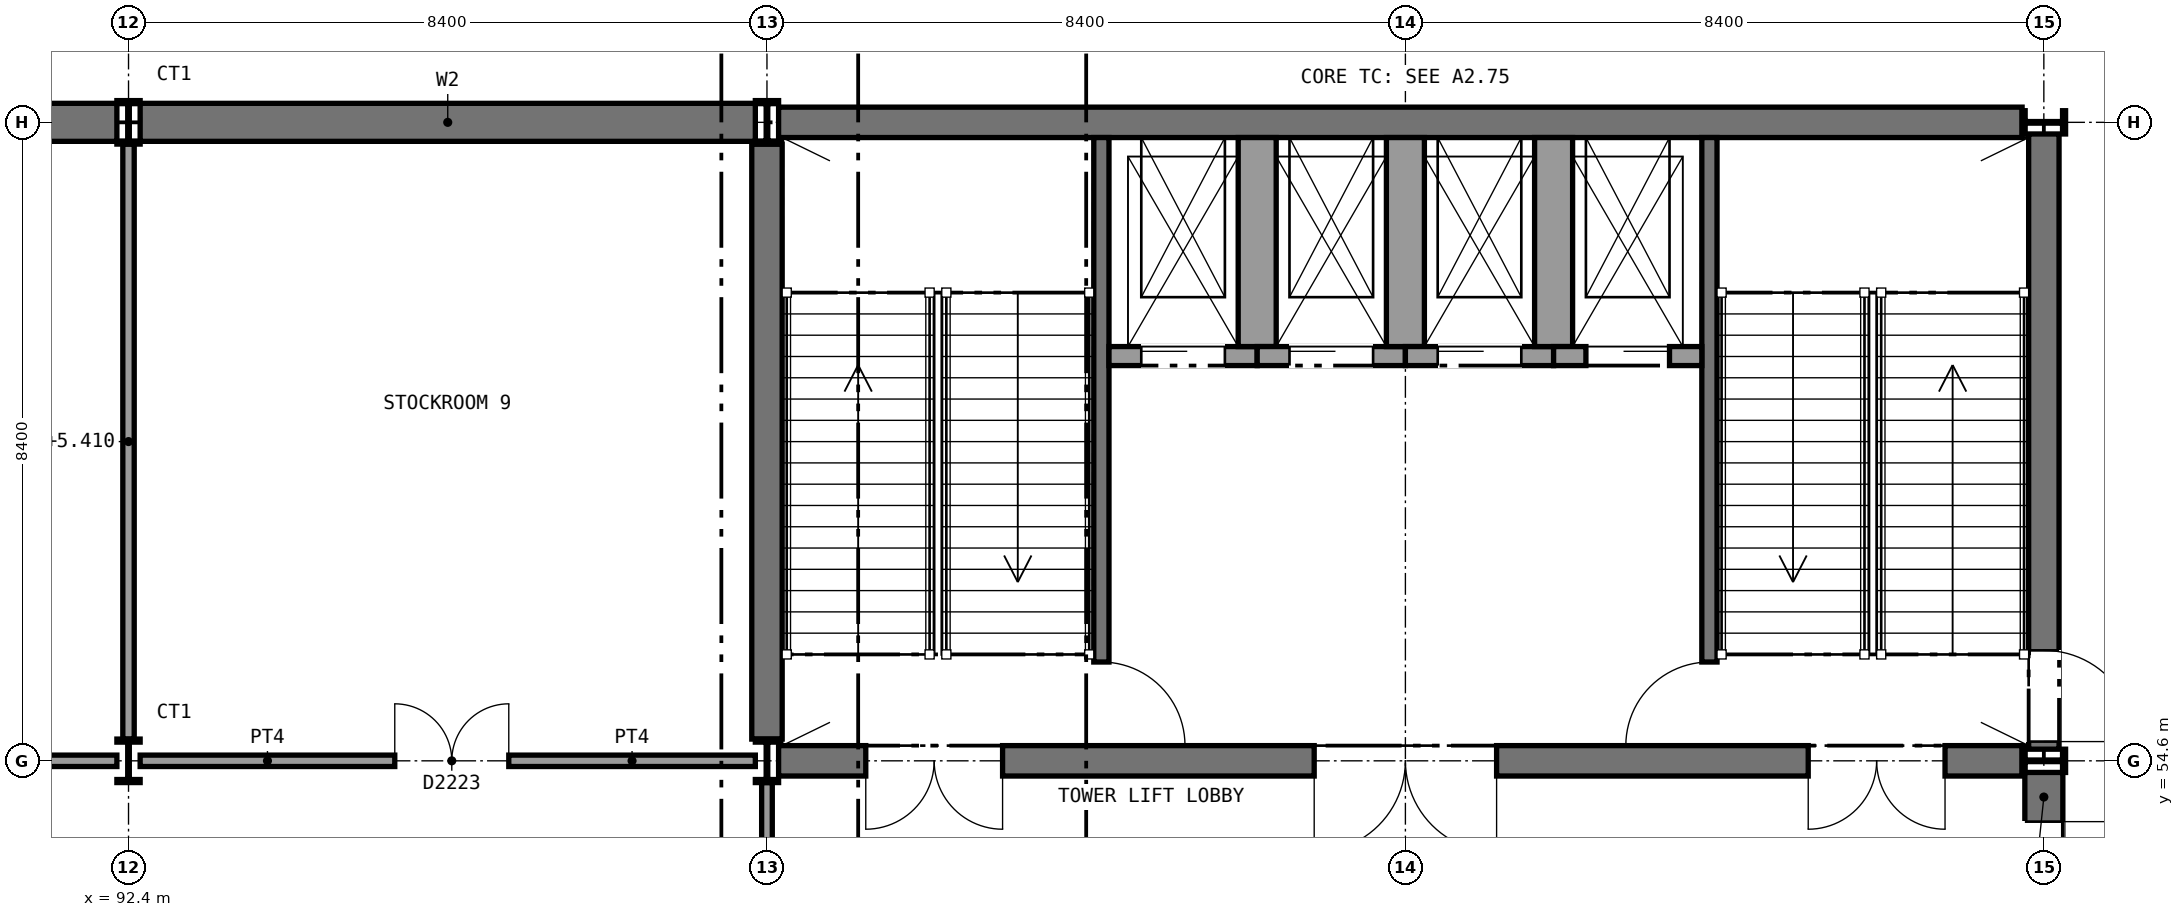
"""IFC4 building model, lengths in metres.
Left out: names, types, materials, properties, quantities, classifications, styles, units other than length and angle.
Written with IfcOpenShell. Run it as: python <this file> out.ifc"""

import sys

from ifc_helpers import new_model, si_unit, direction, frame, frame_2d, origin, origin_2d, place, context, subcontext, project, spatial, rectangle, i_section, extrude, element, fill, save


model = new_model("IFC4")
c1 = context("Model", 3, precision=1e-05, world=origin(), true_north=direction((0.0, 1.0)))
c2 = subcontext(c1, "Body", "Model", "MODEL_VIEW")
j1 = project(units=[si_unit("LENGTHUNIT", "METRE"), si_unit("PLANEANGLEUNIT", "RADIAN")], contexts=[c1])
p1 = place(None, origin())
s1 = spatial("IfcSite", under=j1, at=p1, CompositionType="ELEMENT")
p2 = place(p1, origin())
s2 = spatial("IfcBuilding", under=s1, at=p2, CompositionType="ELEMENT")
p3 = place(p2, origin())
s3 = spatial("IfcBuildingStorey", under=s2, at=p3, CompositionType="ELEMENT", Elevation=0.0)
p4 = place(p3, frame((84.153, 63.0, 0.0), z_axis=(0.0, 0.0, 1.0), x_axis=(1.0, 0.0, 0.0)))
e1 = element("IfcWall", 1, at=p4, inside=s3, PredefinedType="SHEAR", context=c2, shape_type="SweptSolid", body=[
    extrude(rectangle(XDim=8.094, YDim=0.5, at=frame_2d((4.047, 0.0))), origin(), (0.0, 0.0, 1.0), 5.85),
])
p5 = place(p3, frame((92.553, 63.0, 0.0), z_axis=(0.0, 0.0, 1.0), x_axis=(1.0, 0.0, 0.0)))
e2 = element("IfcWall", 2, at=p5, inside=s3, PredefinedType="SHEAR", context=c2, shape_type="SweptSolid", body=[
    extrude(rectangle(XDim=8.094, YDim=0.5, at=frame_2d((4.047, 0.0))), origin(), (0.0, 0.0, 1.0), 5.85),
])
p6 = place(p3, frame((100.953, 63.0, 0.0), z_axis=(0.0, 0.0, 1.0), x_axis=(1.0, 0.0, 0.0)))
e3 = element("IfcWall", 3, at=p6, inside=s3, PredefinedType="SHEAR", context=c2, shape_type="SweptSolid", body=[
    extrude(rectangle(XDim=16.361, YDim=0.4, at=frame_2d((8.181, 0.0))), origin(), (0.0, 0.0, 1.0), 5.85),
])
p7 = place(p3, frame((100.953, 54.6, 0.0), z_axis=(0.0, 0.0, 1.0), x_axis=(1.0, 0.0, 0.0)))
e4 = element("IfcWall", 4, at=p7, inside=s3, PredefinedType="SHEAR", context=c2, shape_type="SweptSolid", body=[
    extrude(rectangle(XDim=16.361, YDim=0.4, at=frame_2d((8.181, 0.0))), origin(), (0.0, 0.0, 1.0), 5.85),
])
p8 = place(p7, frame((13.547, 0.0, 0.0)))
e5 = element("IfcOpeningElement", 5, at=p8, cuts=e4, PredefinedType="OPENING", context=c2, shape_type="SweptSolid", body=[
    extrude(rectangle(XDim=1.8, YDim=2.1, at=frame_2d((0.9, 1.05))), frame((0.0, 0.21, 0.0), z_axis=(0.0, -1.0, 0.0), x_axis=(1.0, 0.0, 0.0)), (0.0, 0.0, 1.0), 0.42),
])
p9 = place(p7, frame((7.047, 0.0, 0.0)))
e6 = element("IfcOpeningElement", 6, at=p9, cuts=e4, PredefinedType="OPENING", context=c2, shape_type="SweptSolid", body=[
    extrude(rectangle(XDim=2.4, YDim=2.4, at=frame_2d((1.2, 1.2))), frame((0.0, 0.21, 0.0), z_axis=(0.0, -1.0, 0.0), x_axis=(1.0, 0.0, 0.0)), (0.0, 0.0, 1.0), 0.42),
])
p10 = place(p7, frame((1.147, 0.0, 0.0)))
e7 = element("IfcOpeningElement", 7, at=p10, cuts=e4, PredefinedType="OPENING", context=c2, shape_type="SweptSolid", body=[
    extrude(rectangle(XDim=1.8, YDim=2.1, at=frame_2d((0.9, 1.05))), frame((0.0, 0.21, 0.0), z_axis=(0.0, -1.0, 0.0), x_axis=(1.0, 0.0, 0.0)), (0.0, 0.0, 1.0), 0.42),
])
p11 = place(p3, frame((100.8, 54.886, 0.0), z_axis=(0.0, 0.0, 1.0), x_axis=(0.0, 1.0, 0.0)))
e8 = element("IfcWall", 8, at=p11, inside=s3, PredefinedType="SHEAR", context=c2, shape_type="SweptSolid", body=[
    extrude(rectangle(XDim=7.828, YDim=0.4, at=frame_2d((3.914, 0.0))), origin(), (0.0, 0.0, 1.0), 5.85),
])
p12 = place(p3, frame((117.6, 54.753, 0.0), z_axis=(0.0, 0.0, 1.0), x_axis=(0.0, 1.0, 0.0)))
e9 = element("IfcWall", 9, at=p12, inside=s3, PredefinedType="SHEAR", context=c2, shape_type="SweptSolid", body=[
    extrude(rectangle(XDim=8.094, YDim=0.4, at=frame_2d((4.047, 0.0))), origin(), (0.0, 0.0, 1.0), 5.85),
])
p13 = place(p12, frame((0.1, 0.0, 0.0)))
e10 = element("IfcOpeningElement", 10, at=p13, cuts=e9, PredefinedType="OPENING", context=c2, shape_type="SweptSolid", body=[
    extrude(rectangle(XDim=1.2, YDim=2.1, at=frame_2d((0.6, 1.05))), frame((0.0, 0.21, 0.0), z_axis=(0.0, -1.0, 0.0), x_axis=(1.0, 0.0, 0.0)), (0.0, 0.0, 1.0), 0.42),
])
for number, where, z_axis, x_axis in (
    (11, (92.4, 54.6, 0.0), (0.0, 0.0, 1.0), (1.0, 0.0, 0.0)),
    (12, (92.4, 63.0, 0.0), (0.0, 0.0, 1.0), (1.0, 0.0, 0.0)),
    (13, (100.8, 54.6, 0.0), (0.0, 0.0, 1.0), (1.0, 0.0, 0.0)),
    (14, (100.8, 63.0, 0.0), (0.0, 0.0, 1.0), (1.0, 0.0, 0.0)),
    (15, (117.6, 54.6, 0.0), (0.0, 0.0, 1.0), (0.0, 1.0, 0.0)),
    (16, (117.6, 63.0, 0.0), (0.0, 0.0, 1.0), (0.0, 1.0, 0.0)),
):
    element("IfcColumn", number, at=place(p3, frame(where, z_axis=z_axis, x_axis=x_axis)), inside=s3, PredefinedType="COLUMN", context=c2, shape_type="SweptSolid", body=[
        extrude(i_section(OverallWidth=0.306, OverallDepth=0.572, WebThickness=0.021, FlangeThickness=0.04, FilletRadius=0.027, at=origin_2d()), origin(), (0.0, 0.0, 1.0), 6.0),
    ])
p14 = place(p3, frame((92.4, 54.886, 0.0), z_axis=(0.0, 0.0, 1.0), x_axis=(0.0, 1.0, 0.0)))
e17 = element("IfcWall", 17, at=p14, inside=s3, PredefinedType="SOLIDWALL", context=c2, shape_type="SweptSolid", body=[
    extrude(rectangle(XDim=7.828, YDim=0.15, at=frame_2d((3.914, 0.0))), origin(), (0.0, 0.0, 1.0), 5.41),
])
p15 = place(p3, frame((84.153, 54.6, 0.0), z_axis=(0.0, 0.0, 1.0), x_axis=(1.0, 0.0, 0.0)))
e18 = element("IfcWall", 18, at=p15, inside=s3, PredefinedType="SOLIDWALL", context=c2, shape_type="SweptSolid", body=[
    extrude(rectangle(XDim=8.094, YDim=0.15, at=frame_2d((4.047, 0.0))), origin(), (0.0, 0.0, 1.0), 5.52),
])
p16 = place(p15, frame((3.35, 0.0, 0.0)))
e19 = element("IfcOpeningElement", 19, at=p16, cuts=e18, PredefinedType="OPENING", context=c2, shape_type="SweptSolid", body=[
    extrude(rectangle(XDim=1.5, YDim=2.1, at=frame_2d((0.75, 1.05))), frame((0.0, 0.085, 0.0), z_axis=(0.0, -1.0, 0.0), x_axis=(1.0, 0.0, 0.0)), (0.0, 0.0, 1.0), 0.17),
])
p17 = place(p3, frame((92.553, 54.6, 0.0), z_axis=(0.0, 0.0, 1.0), x_axis=(1.0, 0.0, 0.0)))
e20 = element("IfcWall", 20, at=p17, inside=s3, PredefinedType="SOLIDWALL", context=c2, shape_type="SweptSolid", body=[
    extrude(rectangle(XDim=8.094, YDim=0.15, at=frame_2d((4.047, 0.0))), origin(), (0.0, 0.0, 1.0), 5.52),
])
p18 = place(p17, frame((3.35, 0.0, 0.0)))
e21 = element("IfcOpeningElement", 21, at=p18, cuts=e20, PredefinedType="OPENING", context=c2, shape_type="SweptSolid", body=[
    extrude(rectangle(XDim=1.5, YDim=2.1, at=frame_2d((0.75, 1.05))), frame((0.0, 0.085, 0.0), z_axis=(0.0, -1.0, 0.0), x_axis=(1.0, 0.0, 0.0)), (0.0, 0.0, 1.0), 0.17),
])
p19 = place(p3, frame((100.8, 51.386, 0.0), z_axis=(0.0, 0.0, 1.0), x_axis=(0.0, 1.0, 0.0)))
e22 = element("IfcWall", 22, at=p19, inside=s3, PredefinedType="PARTITIONING", context=c2, shape_type="SweptSolid", body=[
    extrude(rectangle(XDim=2.928, YDim=0.14, at=frame_2d((1.464, 0.0))), origin(), (0.0, 0.0, 1.0), 5.41),
])
p20 = place(p3, frame((117.6, 46.353, 0.0), z_axis=(0.0, 0.0, 1.0), x_axis=(0.0, 1.0, 0.0)))
e23 = element("IfcWall", 23, at=p20, inside=s3, PredefinedType="STANDARD", context=c2, shape_type="SweptSolid", body=[
    extrude(rectangle(XDim=8.094, YDim=0.5, at=frame_2d((4.047, 0.0))), origin(), (0.0, 0.0, 1.0), 5.85),
])
p21 = place(p20, frame((0.647, 0.0, 0.0)))
e24 = element("IfcOpeningElement", 24, at=p21, cuts=e23, PredefinedType="OPENING", context=c2, shape_type="SweptSolid", body=[
    extrude(rectangle(XDim=2.6, YDim=3.3, at=frame_2d((1.3, 1.65))), frame((0.0, 0.26, 0.0), z_axis=(0.0, -1.0, 0.0), x_axis=(1.0, 0.0, 0.0)), (0.0, 0.0, 1.0), 0.52),
])
p22 = place(p20, frame((4.847, 0.0, 0.0)))
e25 = element("IfcOpeningElement", 25, at=p22, cuts=e23, PredefinedType="OPENING", context=c2, shape_type="SweptSolid", body=[
    extrude(rectangle(XDim=2.6, YDim=3.3, at=frame_2d((1.3, 1.65))), frame((0.0, 0.26, 0.0), z_axis=(0.0, -1.0, 0.0), x_axis=(1.0, 0.0, 0.0)), (0.0, 0.0, 1.0), 0.52),
])
p23 = place(p3, frame((105.2, 62.8, 0.0), z_axis=(0.0, 0.0, 1.0), x_axis=(0.0, -1.0, 0.0)))
e26 = element("IfcWall", 26, at=p23, inside=s3, PredefinedType="SHEAR", context=c2, shape_type="SweptSolid", body=[
    extrude(rectangle(XDim=8.0, YDim=0.2, at=frame_2d((4.0, 0.0))), origin(), (0.0, 0.0, 1.0), 5.85),
])
p24 = place(p23, frame((6.9, 0.0, 0.0)))
e27 = element("IfcOpeningElement", 27, at=p24, cuts=e26, PredefinedType="OPENING", context=c2, shape_type="SweptSolid", body=[
    extrude(rectangle(XDim=1.11, YDim=2.1, at=frame_2d((0.555, 1.05))), frame((0.0, 0.11, 0.0), z_axis=(0.0, -1.0, 0.0), x_axis=(1.0, 0.0, 0.0)), (0.0, 0.0, 1.0), 0.22),
])
p25 = place(p3, frame((113.2, 62.8, 0.0), z_axis=(0.0, 0.0, 1.0), x_axis=(0.0, -1.0, 0.0)))
e28 = element("IfcWall", 28, at=p25, inside=s3, PredefinedType="SHEAR", context=c2, shape_type="SweptSolid", body=[
    extrude(rectangle(XDim=8.0, YDim=0.2, at=frame_2d((4.0, 0.0))), origin(), (0.0, 0.0, 1.0), 5.85),
])
p26 = place(p25, frame((6.9, 0.0, 0.0)))
e29 = element("IfcOpeningElement", 29, at=p26, cuts=e28, PredefinedType="OPENING", context=c2, shape_type="SweptSolid", body=[
    extrude(rectangle(XDim=1.11, YDim=2.1, at=frame_2d((0.555, 1.05))), frame((0.0, 0.11, 0.0), z_axis=(0.0, -1.0, 0.0), x_axis=(1.0, 0.0, 0.0)), (0.0, 0.0, 1.0), 0.22),
])
p27 = place(p3, frame((105.3, 59.925, 0.0), z_axis=(0.0, 0.0, 1.0), x_axis=(1.0, 0.0, 0.0)))
e30 = element("IfcWall", 30, at=p27, inside=s3, PredefinedType="SOLIDWALL", context=c2, shape_type="SweptSolid", body=[
    extrude(rectangle(XDim=1.95, YDim=0.25, at=frame_2d((0.975, 0.0))), origin(), (0.0, 0.0, 1.0), 6.0),
])
p28 = place(p27, frame((0.425, 0.0, 0.0)))
e31 = element("IfcOpeningElement", 31, at=p28, cuts=e30, PredefinedType="OPENING", context=c2, shape_type="SweptSolid", body=[
    extrude(rectangle(XDim=1.1, YDim=2.1, at=frame_2d((0.55, 1.05))), frame((0.0, 0.135, 0.0), z_axis=(0.0, -1.0, 0.0), x_axis=(1.0, 0.0, 0.0)), (0.0, 0.0, 1.0), 0.27),
])
p29 = place(p3, frame((107.25, 62.8, 0.0), z_axis=(0.0, 0.0, 1.0), x_axis=(0.0, -1.0, 0.0)))
e32 = element("IfcWall", 32, at=p29, inside=s3, PredefinedType="SOLIDWALL", context=c2, shape_type="SweptSolid", body=[
    extrude(rectangle(XDim=2.75, YDim=0.5, at=frame_2d((1.375, 0.0))), origin(), (0.0, 0.0, 1.0), 6.0),
])
p30 = place(p3, frame((107.25, 59.925, 0.0), z_axis=(0.0, 0.0, 1.0), x_axis=(1.0, 0.0, 0.0)))
e33 = element("IfcWall", 33, at=p30, inside=s3, PredefinedType="SOLIDWALL", context=c2, shape_type="SweptSolid", body=[
    extrude(rectangle(XDim=1.95, YDim=0.25, at=frame_2d((0.975, 0.0))), origin(), (0.0, 0.0, 1.0), 6.0),
])
p31 = place(p30, frame((0.425, 0.0, 0.0)))
e34 = element("IfcOpeningElement", 34, at=p31, cuts=e33, PredefinedType="OPENING", context=c2, shape_type="SweptSolid", body=[
    extrude(rectangle(XDim=1.1, YDim=2.1, at=frame_2d((0.55, 1.05))), frame((0.0, 0.135, 0.0), z_axis=(0.0, -1.0, 0.0), x_axis=(1.0, 0.0, 0.0)), (0.0, 0.0, 1.0), 0.27),
])
p32 = place(p3, frame((109.2, 62.8, 0.0), z_axis=(0.0, 0.0, 1.0), x_axis=(0.0, -1.0, 0.0)))
e35 = element("IfcWall", 35, at=p32, inside=s3, PredefinedType="SOLIDWALL", context=c2, shape_type="SweptSolid", body=[
    extrude(rectangle(XDim=2.75, YDim=0.5, at=frame_2d((1.375, 0.0))), origin(), (0.0, 0.0, 1.0), 6.0),
])
p33 = place(p3, frame((109.2, 59.925, 0.0), z_axis=(0.0, 0.0, 1.0), x_axis=(1.0, 0.0, 0.0)))
e36 = element("IfcWall", 36, at=p33, inside=s3, PredefinedType="SOLIDWALL", context=c2, shape_type="SweptSolid", body=[
    extrude(rectangle(XDim=1.95, YDim=0.25, at=frame_2d((0.975, 0.0))), origin(), (0.0, 0.0, 1.0), 6.0),
])
p34 = place(p33, frame((0.425, 0.0, 0.0)))
e37 = element("IfcOpeningElement", 37, at=p34, cuts=e36, PredefinedType="OPENING", context=c2, shape_type="SweptSolid", body=[
    extrude(rectangle(XDim=1.1, YDim=2.1, at=frame_2d((0.55, 1.05))), frame((0.0, 0.135, 0.0), z_axis=(0.0, -1.0, 0.0), x_axis=(1.0, 0.0, 0.0)), (0.0, 0.0, 1.0), 0.27),
])
p35 = place(p3, frame((111.15, 62.8, 0.0), z_axis=(0.0, 0.0, 1.0), x_axis=(0.0, -1.0, 0.0)))
e38 = element("IfcWall", 38, at=p35, inside=s3, PredefinedType="SOLIDWALL", context=c2, shape_type="SweptSolid", body=[
    extrude(rectangle(XDim=2.75, YDim=0.5, at=frame_2d((1.375, 0.0))), origin(), (0.0, 0.0, 1.0), 6.0),
])
p36 = place(p3, frame((111.15, 59.925, 0.0), z_axis=(0.0, 0.0, 1.0), x_axis=(1.0, 0.0, 0.0)))
e39 = element("IfcWall", 39, at=p36, inside=s3, PredefinedType="SOLIDWALL", context=c2, shape_type="SweptSolid", body=[
    extrude(rectangle(XDim=1.95, YDim=0.25, at=frame_2d((0.975, 0.0))), origin(), (0.0, 0.0, 1.0), 6.0),
])
p37 = place(p36, frame((0.425, 0.0, 0.0)))
e40 = element("IfcOpeningElement", 40, at=p37, cuts=e39, PredefinedType="OPENING", context=c2, shape_type="SweptSolid", body=[
    extrude(rectangle(XDim=1.1, YDim=2.1, at=frame_2d((0.55, 1.05))), frame((0.0, 0.135, 0.0), z_axis=(0.0, -1.0, 0.0), x_axis=(1.0, 0.0, 0.0)), (0.0, 0.0, 1.0), 0.27),
])
p38 = place(p18, origin())
e41 = element("IfcDoor", 41, at=p38, inside=s3, OperationType="DOUBLE_DOOR_SINGLE_SWING", PredefinedType="DOOR", context=c2, shape_type="SweptSolid", body=[
    extrude(rectangle(XDim=1.5, YDim=2.1, at=frame_2d((0.75, 1.05))), frame((0.0, 0.025, 0.0), z_axis=(0.0, -1.0, 0.0), x_axis=(1.0, 0.0, 0.0)), (0.0, 0.0, 1.0), 0.05),
])
fill(e21, e41)
p39 = place(p22, frame((2.6, 0.0, 0.0), z_axis=(0.0, 0.0, 1.0), x_axis=(-1.0, 0.0, 0.0)))
e42 = element("IfcDoor", 42, at=p39, inside=s3, OperationType="DOUBLE_DOOR_SINGLE_SWING", PredefinedType="DOOR", context=c2, shape_type="SweptSolid", body=[
    extrude(rectangle(XDim=2.6, YDim=3.3, at=frame_2d((1.3, 1.65))), frame((0.0, 0.025, 0.0), z_axis=(0.0, -1.0, 0.0), x_axis=(1.0, 0.0, 0.0)), (0.0, 0.0, 1.0), 0.05),
])
fill(e25, e42)
p40 = place(p24, origin())
e43 = element("IfcDoor", 43, at=p40, inside=s3, OperationType="SINGLE_SWING_RIGHT", PredefinedType="DOOR", context=c2, shape_type="SweptSolid", body=[
    extrude(rectangle(XDim=1.1, YDim=2.1, at=frame_2d((0.55, 1.05))), frame((0.0, 0.025, 0.0), z_axis=(0.0, -1.0, 0.0), x_axis=(1.0, 0.0, 0.0)), (0.0, 0.0, 1.0), 0.05),
])
fill(e27, e43)
p41 = place(p26, frame((1.1, 0.0, 0.0), z_axis=(0.0, 0.0, 1.0), x_axis=(-1.0, 0.0, 0.0)))
e44 = element("IfcDoor", 44, at=p41, inside=s3, OperationType="SINGLE_SWING_LEFT", PredefinedType="DOOR", context=c2, shape_type="SweptSolid", body=[
    extrude(rectangle(XDim=1.1, YDim=2.1, at=frame_2d((0.55, 1.05))), frame((0.0, 0.025, 0.0), z_axis=(0.0, -1.0, 0.0), x_axis=(1.0, 0.0, 0.0)), (0.0, 0.0, 1.0), 0.05),
])
fill(e29, e44)
p42 = place(p28, frame((1.1, 0.0, 0.0), z_axis=(0.0, 0.0, 1.0), x_axis=(-1.0, 0.0, 0.0)))
e45 = element("IfcDoor", 45, at=p42, inside=s3, OperationType="SLIDING_TO_RIGHT", PredefinedType="DOOR", context=c2, shape_type="SweptSolid", body=[
    extrude(rectangle(XDim=1.1, YDim=2.1, at=frame_2d((0.55, 1.05))), frame((0.0, 0.025, 0.0), z_axis=(0.0, -1.0, 0.0), x_axis=(1.0, 0.0, 0.0)), (0.0, 0.0, 1.0), 0.05),
])
fill(e31, e45)
p43 = place(p31, frame((1.1, 0.0, 0.0), z_axis=(0.0, 0.0, 1.0), x_axis=(-1.0, 0.0, 0.0)))
e46 = element("IfcDoor", 46, at=p43, inside=s3, OperationType="SLIDING_TO_RIGHT", PredefinedType="DOOR", context=c2, shape_type="SweptSolid", body=[
    extrude(rectangle(XDim=1.1, YDim=2.1, at=frame_2d((0.55, 1.05))), frame((0.0, 0.025, 0.0), z_axis=(0.0, -1.0, 0.0), x_axis=(1.0, 0.0, 0.0)), (0.0, 0.0, 1.0), 0.05),
])
fill(e34, e46)
p44 = place(p34, frame((1.1, 0.0, 0.0), z_axis=(0.0, 0.0, 1.0), x_axis=(-1.0, 0.0, 0.0)))
e47 = element("IfcDoor", 47, at=p44, inside=s3, OperationType="SLIDING_TO_RIGHT", PredefinedType="DOOR", context=c2, shape_type="SweptSolid", body=[
    extrude(rectangle(XDim=1.1, YDim=2.1, at=frame_2d((0.55, 1.05))), frame((0.0, 0.025, 0.0), z_axis=(0.0, -1.0, 0.0), x_axis=(1.0, 0.0, 0.0)), (0.0, 0.0, 1.0), 0.05),
])
fill(e37, e47)
p45 = place(p37, frame((1.1, 0.0, 0.0), z_axis=(0.0, 0.0, 1.0), x_axis=(-1.0, 0.0, 0.0)))
e48 = element("IfcDoor", 48, at=p45, inside=s3, OperationType="SLIDING_TO_LEFT", PredefinedType="DOOR", context=c2, shape_type="SweptSolid", body=[
    extrude(rectangle(XDim=1.1, YDim=2.1, at=frame_2d((0.55, 1.05))), frame((0.0, 0.025, 0.0), z_axis=(0.0, -1.0, 0.0), x_axis=(1.0, 0.0, 0.0)), (0.0, 0.0, 1.0), 0.05),
])
fill(e40, e48)
p46 = place(p8, frame((1.8, 0.0, 0.0), z_axis=(0.0, 0.0, 1.0), x_axis=(-1.0, 0.0, 0.0)))
e49 = element("IfcDoor", 49, at=p46, inside=s3, OperationType="DOUBLE_DOOR_SINGLE_SWING", PredefinedType="DOOR", context=c2, shape_type="SweptSolid", body=[
    extrude(rectangle(XDim=1.8, YDim=2.1, at=frame_2d((0.9, 1.05))), frame((0.0, 0.025, 0.0), z_axis=(0.0, -1.0, 0.0), x_axis=(1.0, 0.0, 0.0)), (0.0, 0.0, 1.0), 0.05),
])
fill(e5, e49)
p47 = place(p9, frame((2.4, 0.0, 0.0), z_axis=(0.0, 0.0, 1.0), x_axis=(-1.0, 0.0, 0.0)))
e50 = element("IfcDoor", 50, at=p47, inside=s3, OperationType="DOUBLE_DOOR_SINGLE_SWING", PredefinedType="DOOR", context=c2, shape_type="SweptSolid", body=[
    extrude(rectangle(XDim=2.4, YDim=2.4, at=frame_2d((1.2, 1.2))), frame((0.0, 0.025, 0.0), z_axis=(0.0, -1.0, 0.0), x_axis=(1.0, 0.0, 0.0)), (0.0, 0.0, 1.0), 0.05),
])
fill(e6, e50)
p48 = place(p10, frame((1.8, 0.0, 0.0), z_axis=(0.0, 0.0, 1.0), x_axis=(-1.0, 0.0, 0.0)))
e51 = element("IfcDoor", 51, at=p48, inside=s3, OperationType="DOUBLE_DOOR_SINGLE_SWING", PredefinedType="DOOR", context=c2, shape_type="SweptSolid", body=[
    extrude(rectangle(XDim=1.8, YDim=2.1, at=frame_2d((0.9, 1.05))), frame((0.0, 0.025, 0.0), z_axis=(0.0, -1.0, 0.0), x_axis=(1.0, 0.0, 0.0)), (0.0, 0.0, 1.0), 0.05),
])
fill(e7, e51)
p49 = place(p13, frame((1.2, 0.0, 0.0), z_axis=(0.0, 0.0, 1.0), x_axis=(-1.0, 0.0, 0.0)))
e52 = element("IfcDoor", 52, at=p49, inside=s3, OperationType="SINGLE_SWING_RIGHT", PredefinedType="DOOR", context=c2, shape_type="SweptSolid", body=[
    extrude(rectangle(XDim=1.2, YDim=2.1, at=frame_2d((0.6, 1.05))), frame((0.0, 0.025, 0.0), z_axis=(0.0, -1.0, 0.0), x_axis=(1.0, 0.0, 0.0)), (0.0, 0.0, 1.0), 0.05),
])
fill(e10, e52)
save(model, sys.argv[1])
